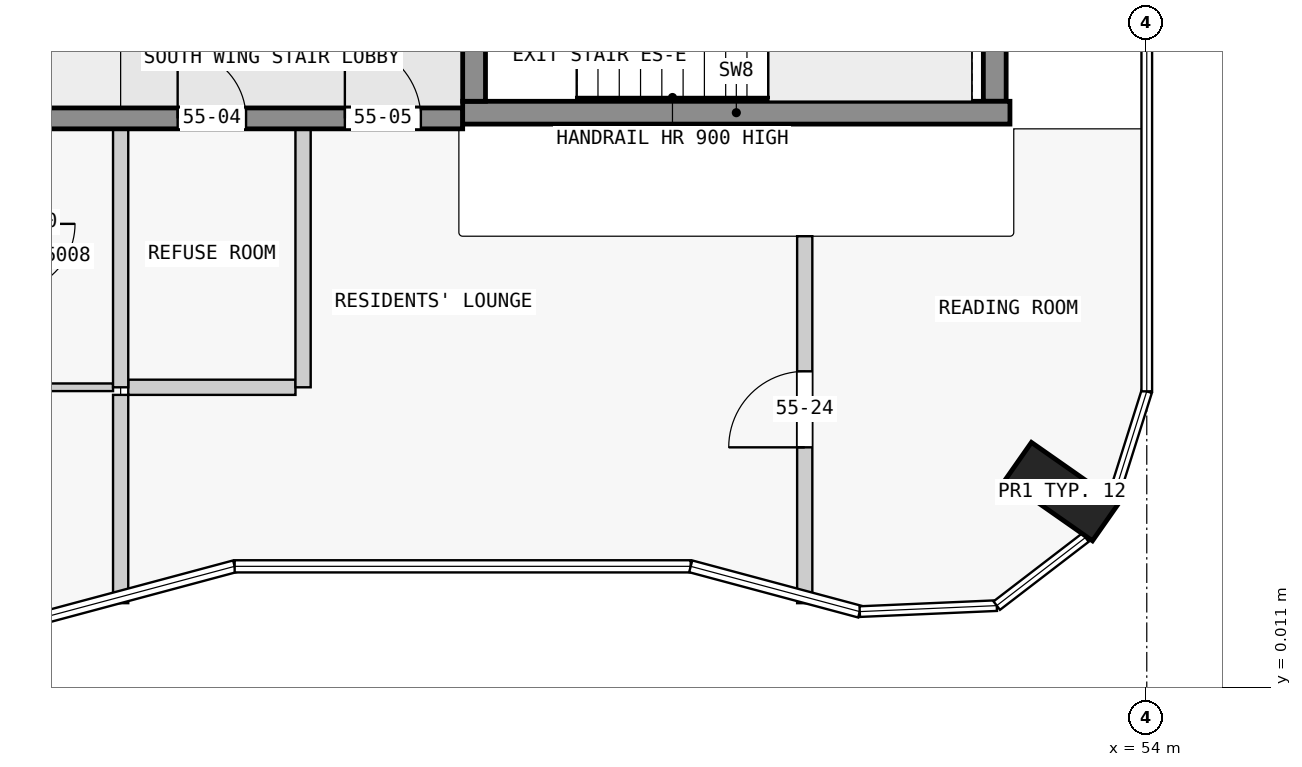
"""IFC4 building model, lengths in metres.
Left out: names, types, materials, properties, quantities, classifications, styles, units other than length and angle.
Written with IfcOpenShell. Run it as: python <this file> out.ifc"""

import sys

from ifc_helpers import new_model, si_unit, direction, frame, frame_2d, origin, origin_2d, place, context, subcontext, project, spatial, rectangle, extrude, element, fill, save


model = new_model("IFC4")
c1 = context("Model", 3, precision=1e-05, world=origin(), true_north=direction((0.0, 1.0)))
c2 = subcontext(c1, "Body", "Model", "MODEL_VIEW")
j1 = project(units=[si_unit("LENGTHUNIT", "METRE"), si_unit("PLANEANGLEUNIT", "RADIAN")], contexts=[c1])
p1 = place(None, origin())
s1 = spatial("IfcSite", under=j1, at=p1, CompositionType="ELEMENT")
p2 = place(p1, origin())
s2 = spatial("IfcBuilding", under=s1, at=p2, CompositionType="ELEMENT")
p3 = place(p2, frame((0.0, 0.0, 211.9)))
s3 = spatial("IfcBuildingStorey", under=s2, at=p3, CompositionType="ELEMENT", Elevation=211.9)
p4 = place(p3, frame((52.884, 2.59, 0.0), z_axis=(0.0, 0.0, 1.0), x_axis=(0.573542637991, 0.819175709117, 0.0)))
e1 = element("IfcColumn", 1, at=p4, inside=s3, PredefinedType="COLUMN", context=c2, shape_type="SweptSolid", body=[
    extrude(rectangle(XDim=0.6, YDim=1.4, at=origin_2d()), origin(), (0.0, 0.0, 1.0), 3.5),
])
p5 = place(p3, frame((45.15, 7.725, 0.0), z_axis=(0.0, 0.0, 1.0), x_axis=(0.0, 1.0, 0.0)))
e2 = element("IfcWall", 2, at=p5, inside=s3, PredefinedType="SHEAR", context=c2, shape_type="SweptSolid", body=[
    extrude(rectangle(XDim=2.55, YDim=0.3, at=frame_2d((1.275, 0.0))), origin(), (0.0, 0.0, 1.0), 3.5),
])
p6 = place(p5, frame((0.725, 0.0, 0.0)))
e3 = element("IfcOpeningElement", 3, at=p6, cuts=e2, PredefinedType="OPENING", context=c2, shape_type="SweptSolid", body=[
    extrude(rectangle(XDim=1.1, YDim=2.1, at=frame_2d((0.55, 1.05))), frame((0.0, 0.16, 0.0), z_axis=(0.0, -1.0, 0.0), x_axis=(1.0, 0.0, 0.0)), (0.0, 0.0, 1.0), 0.32),
])
p7 = place(p3, frame((52.0, 7.725, 0.0), z_axis=(0.0, 0.0, 1.0), x_axis=(0.0, 1.0, 0.0)))
e4 = element("IfcWall", 4, at=p7, inside=s3, PredefinedType="SHEAR", context=c2, shape_type="SweptSolid", body=[
    extrude(rectangle(XDim=2.55, YDim=0.3, at=frame_2d((1.275, 0.0))), origin(), (0.0, 0.0, 1.0), 3.5),
])
p8 = place(p3, frame((45.0, 7.575, 0.0), z_axis=(0.0, 0.0, 1.0), x_axis=(1.0, 0.0, 0.0)))
e5 = element("IfcWall", 5, at=p8, inside=s3, PredefinedType="SHEAR", context=c2, shape_type="SweptSolid", body=[
    extrude(rectangle(XDim=7.2, YDim=0.3, at=frame_2d((3.6, 0.0))), origin(), (0.0, 0.0, 1.0), 3.5),
])
p9 = place(p3, frame((22.5, 7.5, 0.0), z_axis=(0.0, 0.0, 1.0), x_axis=(1.0, 0.0, 0.0)))
e6 = element("IfcWall", 6, at=p9, inside=s3, PredefinedType="SHEAR", context=c2, shape_type="SweptSolid", body=[
    extrude(rectangle(XDim=22.5, YDim=0.275, at=frame_2d((11.25, 0.0))), origin(), (0.0, 0.0, 1.0), 3.25),
])
p10 = place(p9, frame((4.05, 0.0, 0.0)))
e7 = element("IfcOpeningElement", 7, at=p10, cuts=e6, PredefinedType="OPENING", context=c2, shape_type="SweptSolid", body=[
    extrude(rectangle(XDim=1.0, YDim=2.1, at=frame_2d((0.5, 1.05))), frame((0.0, 0.147, 0.0), z_axis=(0.0, -1.0, 0.0), x_axis=(1.0, 0.0, 0.0)), (0.0, 0.0, 1.0), 0.295),
])
p11 = place(p9, frame((10.75, 0.0, 0.0)))
e8 = element("IfcOpeningElement", 8, at=p11, cuts=e6, PredefinedType="OPENING", context=c2, shape_type="SweptSolid", body=[
    extrude(rectangle(XDim=1.0, YDim=2.1, at=frame_2d((0.5, 1.05))), frame((0.0, 0.147, 0.0), z_axis=(0.0, -1.0, 0.0), x_axis=(1.0, 0.0, 0.0)), (0.0, 0.0, 1.0), 0.295),
])
p12 = place(p9, frame((15.25, 0.0, 0.0)))
e9 = element("IfcOpeningElement", 9, at=p12, cuts=e6, PredefinedType="OPENING", context=c2, shape_type="SweptSolid", body=[
    extrude(rectangle(XDim=1.0, YDim=2.1, at=frame_2d((0.5, 1.05))), frame((0.0, 0.147, 0.0), z_axis=(0.0, -1.0, 0.0), x_axis=(1.0, 0.0, 0.0)), (0.0, 0.0, 1.0), 0.295),
])
p13 = place(p9, frame((18.75, 0.0, 0.0)))
e10 = element("IfcOpeningElement", 10, at=p13, cuts=e6, PredefinedType="OPENING", context=c2, shape_type="SweptSolid", body=[
    extrude(rectangle(XDim=0.9, YDim=2.1, at=frame_2d((0.45, 1.05))), frame((0.0, 0.147, 0.0), z_axis=(0.0, -1.0, 0.0), x_axis=(1.0, 0.0, 0.0)), (0.0, 0.0, 1.0), 0.295),
])
p14 = place(p9, frame((20.95, 0.0, 0.0)))
e11 = element("IfcOpeningElement", 11, at=p14, cuts=e6, PredefinedType="OPENING", context=c2, shape_type="SweptSolid", body=[
    extrude(rectangle(XDim=1.0, YDim=2.1, at=frame_2d((0.5, 1.05))), frame((0.0, 0.147, 0.0), z_axis=(0.0, -1.0, 0.0), x_axis=(1.0, 0.0, 0.0)), (0.0, 0.0, 1.0), 0.295),
])
p15 = place(p3, frame((39.05, 3.962, 0.0), z_axis=(0.0, 0.0, 1.0), x_axis=(1.0, 0.0, 0.0)))
e12 = element("IfcWall", 12, at=p15, inside=s3, PredefinedType="PARTITIONING", context=c2, shape_type="SweptSolid", body=[
    extrude(rectangle(XDim=1.35, YDim=0.1, at=frame_2d((0.675, 0.0))), origin(), (0.0, 0.0, 1.0), 3.25),
])
p16 = place(p3, frame((40.6, 3.962, 0.0), z_axis=(0.0, 0.0, 1.0), x_axis=(1.0, 0.0, 0.0)))
e13 = element("IfcWall", 13, at=p16, inside=s3, PredefinedType="PARTITIONING", context=c2, shape_type="SweptSolid", body=[
    extrude(rectangle(XDim=2.2, YDim=0.2, at=frame_2d((1.1, 0.0))), origin(), (0.0, 0.0, 1.0), 3.25),
])
p17 = place(p3, frame((40.5, 3.863, 0.0), z_axis=(0.0, 0.0, 1.0), x_axis=(0.0, -1.0, 0.0)))
e14 = element("IfcWall", 14, at=p17, inside=s3, PredefinedType="PARTITIONING", context=c2, shape_type="SweptSolid", body=[
    extrude(rectangle(XDim=2.74, YDim=0.2, at=frame_2d((1.37, 0.0))), origin(), (0.0, 0.0, 1.0), 3.25),
])
for number, where, z_axis, x_axis in (
    (15, (40.5, 3.962, 0.0), (0.0, 0.0, 1.0), (0.0, 1.0, 0.0)),
    (16, (42.9, 3.962, 0.0), (0.0, 0.0, 1.0), (0.0, 1.0, 0.0)),
):
    element("IfcWall", number, at=place(p3, frame(where, z_axis=z_axis, x_axis=x_axis)), inside=s3, PredefinedType="PARTITIONING", context=c2, shape_type="SweptSolid", body=[
        extrude(rectangle(XDim=3.4, YDim=0.2, at=frame_2d((1.7, 0.0))), origin(), (0.0, 0.0, 1.0), 3.25),
    ])
p18 = place(p3, frame((49.5, 1.122, 0.0), z_axis=(0.0, 0.0, 1.0), x_axis=(0.0, 1.0, 0.0)))
e17 = element("IfcWall", 17, at=p18, inside=s3, PredefinedType="PARTITIONING", context=c2, shape_type="SweptSolid", body=[
    extrude(rectangle(XDim=4.828, YDim=0.2, at=frame_2d((2.414, 0.0))), origin(), (0.0, 0.0, 1.0), 3.25),
])
p19 = place(p18, frame((2.05, 0.0, 0.0)))
e18 = element("IfcOpeningElement", 18, at=p19, cuts=e17, PredefinedType="OPENING", context=c2, shape_type="SweptSolid", body=[
    extrude(rectangle(XDim=1.0, YDim=2.1, at=frame_2d((0.5, 1.05))), frame((0.0, 0.11, 0.0), z_axis=(0.0, -1.0, 0.0), x_axis=(1.0, 0.0, 0.0)), (0.0, 0.0, 1.0), 0.22),
])
p20 = place(p13, origin())
e19 = element("IfcDoor", 19, at=p20, inside=s3, OperationType="SINGLE_SWING_RIGHT", PredefinedType="DOOR", context=c2, shape_type="SweptSolid", body=[
    extrude(rectangle(XDim=0.9, YDim=2.1, at=frame_2d((0.45, 1.05))), frame((0.0, 0.025, 0.0), z_axis=(0.0, -1.0, 0.0), x_axis=(1.0, 0.0, 0.0)), (0.0, 0.0, 1.0), 0.05),
])
fill(e10, e19)
p21 = place(p14, origin())
e20 = element("IfcDoor", 20, at=p21, inside=s3, OperationType="SINGLE_SWING_RIGHT", PredefinedType="DOOR", context=c2, shape_type="SweptSolid", body=[
    extrude(rectangle(XDim=1.0, YDim=2.1, at=frame_2d((0.5, 1.05))), frame((0.0, 0.025, 0.0), z_axis=(0.0, -1.0, 0.0), x_axis=(1.0, 0.0, 0.0)), (0.0, 0.0, 1.0), 0.05),
])
fill(e11, e20)
p22 = place(p19, origin())
e21 = element("IfcDoor", 21, at=p22, inside=s3, OperationType="SINGLE_SWING_RIGHT", PredefinedType="DOOR", context=c2, shape_type="SweptSolid", body=[
    extrude(rectangle(XDim=1.0, YDim=2.1, at=frame_2d((0.5, 1.05))), frame((0.0, 0.025, 0.0), z_axis=(0.0, -1.0, 0.0), x_axis=(1.0, 0.0, 0.0)), (0.0, 0.0, 1.0), 0.05),
])
fill(e18, e21)
save(model, sys.argv[1])
